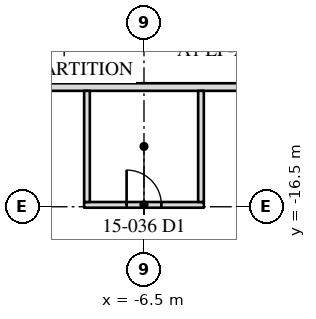
"""IFC4 building model, lengths in metres.
Left out: names, types, materials, properties, quantities, classifications, styles, units other than length and angle.
Written with IfcOpenShell. Run it as: python <this file> out.ifc"""

import sys

from ifc_helpers import new_model, si_unit, direction, frame, frame_2d, origin, place, context, subcontext, project, spatial, rectangle, extrude, element, fill, save


model = new_model("IFC4")
c1 = context("Model", 3, precision=1e-05, world=origin(), true_north=direction((0.0, 1.0)))
c2 = subcontext(c1, "Body", "Model", "MODEL_VIEW")
j1 = project(units=[si_unit("LENGTHUNIT", "METRE"), si_unit("PLANEANGLEUNIT", "RADIAN")], contexts=[c1])
p1 = place(None, origin())
s1 = spatial("IfcSite", under=j1, at=p1, CompositionType="ELEMENT")
p2 = place(p1, origin())
s2 = spatial("IfcBuilding", under=s1, at=p2, CompositionType="ELEMENT")
p3 = place(p2, frame((0.0, 0.0, 65.2)))
s3 = spatial("IfcBuildingStorey", under=s2, at=p3, CompositionType="ELEMENT", Elevation=65.2)
p4 = place(p3, frame((-13.45, -13.35, 0.0), z_axis=(0.0, 0.0, 1.0), x_axis=(1.0, 0.0, 0.0)))
e1 = element("IfcWall", 1, at=p4, inside=s3, PredefinedType="PARTITIONING", context=c2, shape_type="SweptSolid", body=[
    extrude(rectangle(XDim=26.7, YDim=0.2, at=frame_2d((13.35, 0.0))), origin(), (0.0, 0.0, 1.0), 3.91),
])
p5 = place(p3, frame((-8.075, -16.45, 0.0), z_axis=(0.0, 0.0, 1.0), x_axis=(1.0, 0.0, 0.0)))
e2 = element("IfcWall", 2, at=p5, inside=s3, PredefinedType="PARTITIONING", context=c2, shape_type="SweptSolid", body=[
    extrude(rectangle(XDim=3.15, YDim=0.15, at=frame_2d((1.575, 0.0))), origin(), (0.0, 0.0, 1.0), 3.91),
])
p6 = place(p5, frame((1.117, 0.0, 0.0)))
e3 = element("IfcOpeningElement", 3, at=p6, cuts=e2, PredefinedType="OPENING", context=c2, shape_type="SweptSolid", body=[
    extrude(rectangle(XDim=0.915, YDim=2.134, at=frame_2d((0.458, 1.067))), frame((0.0, 0.085, 0.0), z_axis=(0.0, -1.0, 0.0), x_axis=(1.0, 0.0, 0.0)), (0.0, 0.0, 1.0), 0.17),
])
for number, where, z_axis, x_axis in (
    (4, (-8.0, -16.375, 0.0), (0.0, 0.0, 1.0), (0.0, 1.0, 0.0)),
    (5, (-5.0, -16.375, 0.0), (0.0, 0.0, 1.0), (0.0, 1.0, 0.0)),
):
    element("IfcWall", number, at=place(p3, frame(where, z_axis=z_axis, x_axis=x_axis)), inside=s3, PredefinedType="PARTITIONING", context=c2, shape_type="SweptSolid", body=[
        extrude(rectangle(XDim=2.925, YDim=0.15, at=frame_2d((1.462, 0.0))), origin(), (0.0, 0.0, 1.0), 3.91),
    ])
p7 = place(p6, origin())
e6 = element("IfcDoor", 6, at=p7, inside=s3, OperationType="SINGLE_SWING_LEFT", PredefinedType="DOOR", context=c2, shape_type="SweptSolid", body=[
    extrude(rectangle(XDim=0.915, YDim=2.134, at=frame_2d((0.458, 1.067))), frame((0.0, 0.025, 0.0), z_axis=(0.0, -1.0, 0.0), x_axis=(1.0, 0.0, 0.0)), (0.0, 0.0, 1.0), 0.05),
])
fill(e3, e6)
save(model, sys.argv[1])
